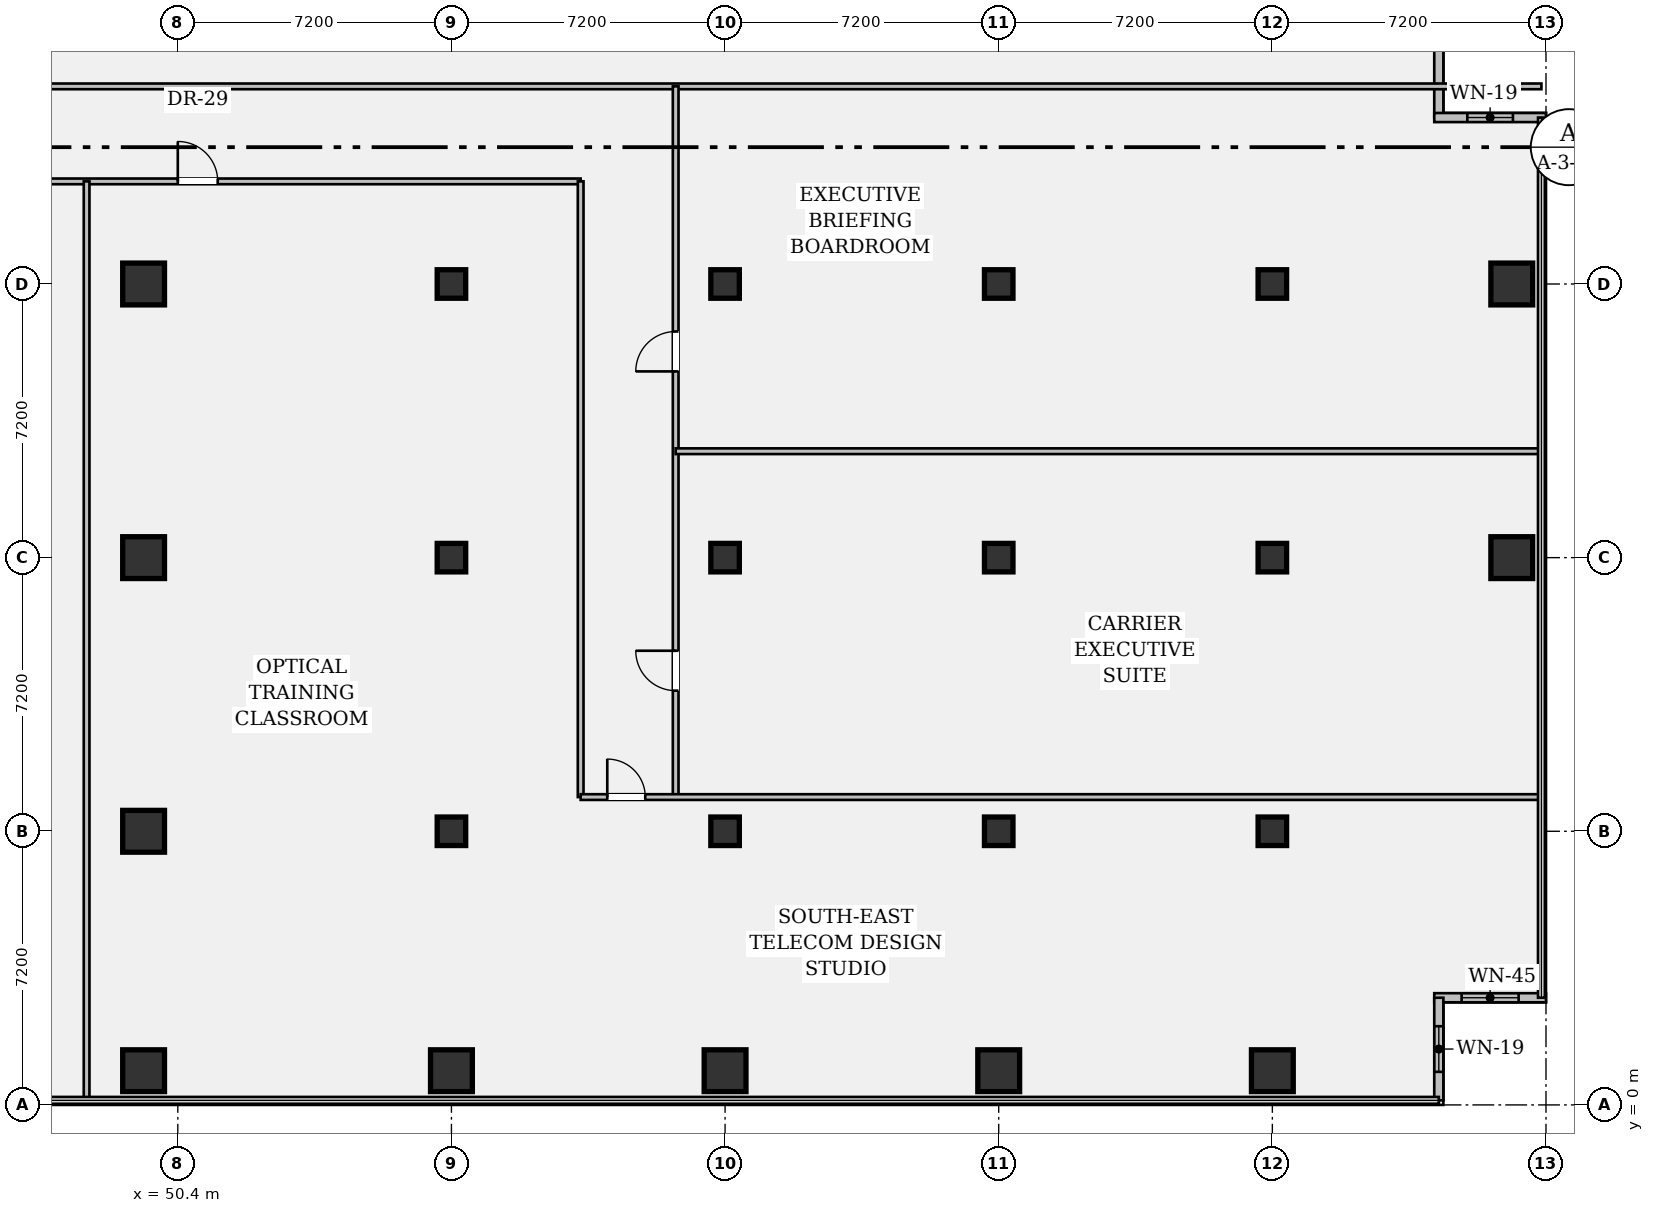
"""IFC4 building model, lengths in metres.
Left out: names, types, materials, properties, quantities, classifications, styles, units other than length and angle.
Written with IfcOpenShell. Run it as: python <this file> out.ifc"""

import sys

from ifc_helpers import new_model, si_unit, direction, frame, frame_2d, origin, origin_2d, place, context, subcontext, project, spatial, rectangle, hollow_rectangle, extrude, element, fill, save


model = new_model("IFC4")
c1 = context("Model", 3, precision=1e-05, world=origin(), true_north=direction((0.0, 1.0)))
c2 = subcontext(c1, "Body", "Model", "MODEL_VIEW")
j1 = project(units=[si_unit("LENGTHUNIT", "METRE"), si_unit("PLANEANGLEUNIT", "RADIAN")], contexts=[c1])
p1 = place(None, origin())
s1 = spatial("IfcSite", under=j1, at=p1, CompositionType="ELEMENT")
p2 = place(p1, origin())
s2 = spatial("IfcBuilding", under=s1, at=p2, CompositionType="ELEMENT")
p3 = place(p2, frame((0.0, 0.0, 17.85)))
s3 = spatial("IfcBuildingStorey", under=s2, at=p3, CompositionType="ELEMENT", Elevation=17.85)
for number, where, z_axis, x_axis in (
    (1, (49.5, 0.9, 0.0), (0.0, 0.0, 1.0), (1.0, 0.0, 0.0)),
    (2, (49.5, 7.2, 0.0), (0.0, 0.0, 1.0), (1.0, 0.0, 0.0)),
    (3, (49.5, 14.4, 0.0), (0.0, 0.0, 1.0), (1.0, 0.0, 0.0)),
    (4, (49.5, 21.6, 0.0), (0.0, 0.0, 1.0), (1.0, 0.0, 0.0)),
    (5, (57.6, 0.9, 0.0), (0.0, 0.0, 1.0), (1.0, 0.0, 0.0)),
):
    element("IfcColumn", number, at=place(p3, frame(where, z_axis=z_axis, x_axis=x_axis)), inside=s3, PredefinedType="COLUMN", context=c2, shape_type="SweptSolid", body=[
        extrude(hollow_rectangle(XDim=1.1, YDim=1.1, WallThickness=0.07, at=origin_2d()), origin(), (0.0, 0.0, 1.0), 3.91),
    ])
for number, where, z_axis, x_axis in (
    (6, (57.6, 7.2, 0.0), (0.0, 0.0, 1.0), (1.0, 0.0, 0.0)),
    (7, (57.6, 14.4, 0.0), (0.0, 0.0, 1.0), (1.0, 0.0, 0.0)),
    (8, (57.6, 21.6, 0.0), (0.0, 0.0, 1.0), (1.0, 0.0, 0.0)),
):
    element("IfcColumn", number, at=place(p3, frame(where, z_axis=z_axis, x_axis=x_axis)), inside=s3, PredefinedType="COLUMN", context=c2, shape_type="SweptSolid", body=[
        extrude(rectangle(XDim=0.75, YDim=0.75, at=origin_2d()), origin(), (0.0, 0.0, 1.0), 3.91),
    ])
p4 = place(p3, frame((64.8, 0.9, 0.0), z_axis=(0.0, 0.0, 1.0), x_axis=(1.0, 0.0, 0.0)))
e9 = element("IfcColumn", 9, at=p4, inside=s3, PredefinedType="COLUMN", context=c2, shape_type="SweptSolid", body=[
    extrude(hollow_rectangle(XDim=1.1, YDim=1.1, WallThickness=0.07, at=origin_2d()), origin(), (0.0, 0.0, 1.0), 3.91),
])
for number, where, z_axis, x_axis in (
    (10, (64.8, 7.2, 0.0), (0.0, 0.0, 1.0), (1.0, 0.0, 0.0)),
    (11, (64.8, 14.4, 0.0), (0.0, 0.0, 1.0), (1.0, 0.0, 0.0)),
    (12, (64.8, 21.6, 0.0), (0.0, 0.0, 1.0), (1.0, 0.0, 0.0)),
):
    element("IfcColumn", number, at=place(p3, frame(where, z_axis=z_axis, x_axis=x_axis)), inside=s3, PredefinedType="COLUMN", context=c2, shape_type="SweptSolid", body=[
        extrude(rectangle(XDim=0.75, YDim=0.75, at=origin_2d()), origin(), (0.0, 0.0, 1.0), 3.91),
    ])
p5 = place(p3, frame((72.0, 0.9, 0.0), z_axis=(0.0, 0.0, 1.0), x_axis=(1.0, 0.0, 0.0)))
e13 = element("IfcColumn", 13, at=p5, inside=s3, PredefinedType="COLUMN", context=c2, shape_type="SweptSolid", body=[
    extrude(hollow_rectangle(XDim=1.1, YDim=1.1, WallThickness=0.07, at=origin_2d()), origin(), (0.0, 0.0, 1.0), 3.91),
])
for number, where, z_axis, x_axis in (
    (14, (72.0, 7.2, 0.0), (0.0, 0.0, 1.0), (1.0, 0.0, 0.0)),
    (15, (72.0, 14.4, 0.0), (0.0, 0.0, 1.0), (1.0, 0.0, 0.0)),
    (16, (72.0, 21.6, 0.0), (0.0, 0.0, 1.0), (1.0, 0.0, 0.0)),
):
    element("IfcColumn", number, at=place(p3, frame(where, z_axis=z_axis, x_axis=x_axis)), inside=s3, PredefinedType="COLUMN", context=c2, shape_type="SweptSolid", body=[
        extrude(rectangle(XDim=0.75, YDim=0.75, at=origin_2d()), origin(), (0.0, 0.0, 1.0), 3.91),
    ])
p6 = place(p3, frame((79.2, 0.9, 0.0), z_axis=(0.0, 0.0, 1.0), x_axis=(1.0, 0.0, 0.0)))
e17 = element("IfcColumn", 17, at=p6, inside=s3, PredefinedType="COLUMN", context=c2, shape_type="SweptSolid", body=[
    extrude(hollow_rectangle(XDim=1.1, YDim=1.1, WallThickness=0.07, at=origin_2d()), origin(), (0.0, 0.0, 1.0), 3.91),
])
for number, where, z_axis, x_axis in (
    (18, (79.2, 7.2, 0.0), (0.0, 0.0, 1.0), (1.0, 0.0, 0.0)),
    (19, (79.2, 14.4, 0.0), (0.0, 0.0, 1.0), (1.0, 0.0, 0.0)),
    (20, (79.2, 21.6, 0.0), (0.0, 0.0, 1.0), (1.0, 0.0, 0.0)),
):
    element("IfcColumn", number, at=place(p3, frame(where, z_axis=z_axis, x_axis=x_axis)), inside=s3, PredefinedType="COLUMN", context=c2, shape_type="SweptSolid", body=[
        extrude(rectangle(XDim=0.75, YDim=0.75, at=origin_2d()), origin(), (0.0, 0.0, 1.0), 3.91),
    ])
for number, where, z_axis, x_axis in (
    (21, (85.5, 14.4, 0.0), (0.0, 0.0, 1.0), (1.0, 0.0, 0.0)),
    (22, (85.5, 21.6, 0.0), (0.0, 0.0, 1.0), (1.0, 0.0, 0.0)),
):
    element("IfcColumn", number, at=place(p3, frame(where, z_axis=z_axis, x_axis=x_axis)), inside=s3, PredefinedType="COLUMN", context=c2, shape_type="SweptSolid", body=[
        extrude(hollow_rectangle(XDim=1.1, YDim=1.1, WallThickness=0.07, at=origin_2d()), origin(), (0.0, 0.0, 1.0), 3.91),
    ])
p7 = place(p3, frame((83.58, 28.68, 0.0), z_axis=(0.0, 0.0, 1.0), x_axis=(0.0, -1.0, 0.0)))
e23 = element("IfcWall", 23, at=p7, inside=s3, PredefinedType="STANDARD", context=c2, shape_type="SweptSolid", body=[
    extrude(rectangle(XDim=2.7, YDim=0.24, at=frame_2d((1.35, 0.0))), origin(), (0.0, 0.0, 1.0), 3.91),
])
p8 = place(p3, frame((83.46, 25.98, 0.0), z_axis=(0.0, 0.0, 1.0), x_axis=(1.0, 0.0, 0.0)))
e24 = element("IfcWall", 24, at=p8, inside=s3, PredefinedType="STANDARD", context=c2, shape_type="SweptSolid", body=[
    extrude(rectangle(XDim=2.94, YDim=0.24, at=frame_2d((1.47, 0.0))), origin(), (0.0, 0.0, 1.0), 3.91),
])
p9 = place(p8, frame((0.87, 0.0, 0.95)))
e25 = element("IfcOpeningElement", 25, at=p9, cuts=e24, PredefinedType="OPENING", context=c2, shape_type="SweptSolid", body=[
    extrude(rectangle(XDim=1.2, YDim=1.8, at=frame_2d((0.6, 0.9))), frame((0.0, 0.132, 0.0), z_axis=(0.0, -1.0, 0.0), x_axis=(1.0, 0.0, 0.0)), (0.0, 0.0, 1.0), 0.264),
])
p10 = place(p3, frame((86.4, 2.82, 0.0), z_axis=(0.0, 0.0, 1.0), x_axis=(-1.0, 0.0, 0.0)))
e26 = element("IfcWall", 26, at=p10, inside=s3, PredefinedType="STANDARD", context=c2, shape_type="SweptSolid", body=[
    extrude(rectangle(XDim=2.94, YDim=0.24, at=frame_2d((1.47, 0.0))), origin(), (0.0, 0.0, 1.0), 3.91),
])
p11 = place(p10, frame((0.72, 0.0, 0.95)))
e27 = element("IfcOpeningElement", 27, at=p11, cuts=e26, PredefinedType="OPENING", context=c2, shape_type="SweptSolid", body=[
    extrude(rectangle(XDim=1.5, YDim=1.8, at=frame_2d((0.75, 0.9))), frame((0.0, 0.132, 0.0), z_axis=(0.0, -1.0, 0.0), x_axis=(1.0, 0.0, 0.0)), (0.0, 0.0, 1.0), 0.264),
])
p12 = place(p3, frame((83.58, 2.82, 0.0), z_axis=(0.0, 0.0, 1.0), x_axis=(0.0, -1.0, 0.0)))
e28 = element("IfcWall", 28, at=p12, inside=s3, PredefinedType="STANDARD", context=c2, shape_type="SweptSolid", body=[
    extrude(rectangle(XDim=2.7, YDim=0.24, at=frame_2d((1.35, 0.0))), origin(), (0.0, 0.0, 1.0), 3.91),
])
p13 = place(p12, frame((0.75, 0.0, 0.95)))
e29 = element("IfcOpeningElement", 29, at=p13, cuts=e28, PredefinedType="OPENING", context=c2, shape_type="SweptSolid", body=[
    extrude(rectangle(XDim=1.2, YDim=1.8, at=frame_2d((0.6, 0.9))), frame((0.0, 0.132, 0.0), z_axis=(0.0, -1.0, 0.0), x_axis=(1.0, 0.0, 0.0)), (0.0, 0.0, 1.0), 0.264),
])
p14 = place(p3, frame((17.45, 24.3, 0.0), z_axis=(0.0, 0.0, 1.0), x_axis=(1.0, 0.0, 0.0)))
e30 = element("IfcWall", 30, at=p14, inside=s3, PredefinedType="PARTITIONING", context=c2, shape_type="SweptSolid", body=[
    extrude(rectangle(XDim=43.55, YDim=0.15, at=frame_2d((21.775, 0.0))), origin(), (0.0, 0.0, 1.0), 2.968),
])
p15 = place(p14, frame((3.2, 0.0, 0.0)))
e31 = element("IfcOpeningElement", 31, at=p15, cuts=e30, PredefinedType="OPENING", context=c2, shape_type="SweptSolid", body=[
    extrude(rectangle(XDim=1.2, YDim=2.15, at=frame_2d((0.6, 1.075))), frame((0.0, 0.087, 0.0), z_axis=(0.0, -1.0, 0.0), x_axis=(1.0, 0.0, 0.0)), (0.0, 0.0, 1.0), 0.174),
])
p16 = place(p14, frame((18.55, 0.0, 0.0)))
e32 = element("IfcOpeningElement", 32, at=p16, cuts=e30, PredefinedType="OPENING", context=c2, shape_type="SweptSolid", body=[
    extrude(rectangle(XDim=1.2, YDim=2.15, at=frame_2d((0.6, 1.075))), frame((0.0, 0.087, 0.0), z_axis=(0.0, -1.0, 0.0), x_axis=(1.0, 0.0, 0.0)), (0.0, 0.0, 1.0), 0.174),
])
p17 = place(p14, frame((32.95, 0.0, 0.0)))
e33 = element("IfcOpeningElement", 33, at=p17, cuts=e30, PredefinedType="OPENING", context=c2, shape_type="SweptSolid", body=[
    extrude(rectangle(XDim=1.05, YDim=2.15, at=frame_2d((0.525, 1.075))), frame((0.0, 0.087, 0.0), z_axis=(0.0, -1.0, 0.0), x_axis=(1.0, 0.0, 0.0)), (0.0, 0.0, 1.0), 0.174),
])
p18 = place(p3, frame((17.45, 26.8, 0.0), z_axis=(0.0, 0.0, 1.0), x_axis=(1.0, 0.0, 0.0)))
e34 = element("IfcWall", 34, at=p18, inside=s3, PredefinedType="PARTITIONING", context=c2, shape_type="SweptSolid", body=[
    extrude(rectangle(XDim=68.83, YDim=0.15, at=frame_2d((34.415, 0.0))), origin(), (0.0, 0.0, 1.0), 2.968),
])
p19 = place(p18, frame((6.2, 0.0, 0.0)))
e35 = element("IfcOpeningElement", 35, at=p19, cuts=e34, PredefinedType="OPENING", context=c2, shape_type="SweptSolid", body=[
    extrude(rectangle(XDim=1.05, YDim=2.15, at=frame_2d((0.525, 1.075))), frame((0.0, 0.087, 0.0), z_axis=(0.0, -1.0, 0.0), x_axis=(1.0, 0.0, 0.0)), (0.0, 0.0, 1.0), 0.174),
])
p20 = place(p18, frame((20.4, 0.0, 0.0)))
e36 = element("IfcOpeningElement", 36, at=p20, cuts=e34, PredefinedType="OPENING", context=c2, shape_type="SweptSolid", body=[
    extrude(rectangle(XDim=1.05, YDim=2.15, at=frame_2d((0.525, 1.075))), frame((0.0, 0.087, 0.0), z_axis=(0.0, -1.0, 0.0), x_axis=(1.0, 0.0, 0.0)), (0.0, 0.0, 1.0), 0.174),
])
p21 = place(p3, frame((61.0, 8.1, 0.0), z_axis=(0.0, 0.0, 1.0), x_axis=(0.0, 1.0, 0.0)))
e37 = element("IfcWall", 37, at=p21, inside=s3, PredefinedType="PARTITIONING", context=c2, shape_type="SweptSolid", body=[
    extrude(rectangle(XDim=16.2, YDim=0.15, at=frame_2d((8.1, 0.0))), origin(), (0.0, 0.0, 1.0), 2.968),
])
p22 = place(p3, frame((63.5, 8.1, 0.0), z_axis=(0.0, 0.0, 1.0), x_axis=(0.0, 1.0, 0.0)))
e38 = element("IfcWall", 38, at=p22, inside=s3, PredefinedType="PARTITIONING", context=c2, shape_type="SweptSolid", body=[
    extrude(rectangle(XDim=18.7, YDim=0.15, at=frame_2d((9.35, 0.0))), origin(), (0.0, 0.0, 1.0), 2.968),
])
p23 = place(p22, frame((11.2, 0.0, 0.0)))
e39 = element("IfcOpeningElement", 39, at=p23, cuts=e38, PredefinedType="OPENING", context=c2, shape_type="SweptSolid", body=[
    extrude(rectangle(XDim=1.05, YDim=2.15, at=frame_2d((0.525, 1.075))), frame((0.0, 0.087, 0.0), z_axis=(0.0, -1.0, 0.0), x_axis=(1.0, 0.0, 0.0)), (0.0, 0.0, 1.0), 0.174),
])
p24 = place(p22, frame((2.8, 0.0, 0.0)))
e40 = element("IfcOpeningElement", 40, at=p24, cuts=e38, PredefinedType="OPENING", context=c2, shape_type="SweptSolid", body=[
    extrude(rectangle(XDim=1.05, YDim=2.15, at=frame_2d((0.525, 1.075))), frame((0.0, 0.087, 0.0), z_axis=(0.0, -1.0, 0.0), x_axis=(1.0, 0.0, 0.0)), (0.0, 0.0, 1.0), 0.174),
])
p25 = place(p3, frame((61.0, 8.1, 0.0), z_axis=(0.0, 0.0, 1.0), x_axis=(1.0, 0.0, 0.0)))
e41 = element("IfcWall", 41, at=p25, inside=s3, PredefinedType="PARTITIONING", context=c2, shape_type="SweptSolid", body=[
    extrude(rectangle(XDim=25.28, YDim=0.15, at=frame_2d((12.64, 0.0))), origin(), (0.0, 0.0, 1.0), 2.968),
])
p26 = place(p25, frame((0.7, 0.0, 0.0)))
e42 = element("IfcOpeningElement", 42, at=p26, cuts=e41, PredefinedType="OPENING", context=c2, shape_type="SweptSolid", body=[
    extrude(rectangle(XDim=1.0, YDim=2.15, at=frame_2d((0.5, 1.075))), frame((0.0, 0.087, 0.0), z_axis=(0.0, -1.0, 0.0), x_axis=(1.0, 0.0, 0.0)), (0.0, 0.0, 1.0), 0.174),
])
p27 = place(p3, frame((48.0, 0.12, 0.0), z_axis=(0.0, 0.0, 1.0), x_axis=(0.0, 1.0, 0.0)))
e43 = element("IfcWall", 43, at=p27, inside=s3, PredefinedType="PARTITIONING", context=c2, shape_type="SweptSolid", body=[
    extrude(rectangle(XDim=24.18, YDim=0.15, at=frame_2d((12.09, 0.0))), origin(), (0.0, 0.0, 1.0), 2.968),
])
p28 = place(p3, frame((63.5, 17.2, 0.0), z_axis=(0.0, 0.0, 1.0), x_axis=(1.0, 0.0, 0.0)))
e44 = element("IfcWall", 44, at=p28, inside=s3, PredefinedType="PARTITIONING", context=c2, shape_type="SweptSolid", body=[
    extrude(rectangle(XDim=22.78, YDim=0.15, at=frame_2d((11.39, 0.0))), origin(), (0.0, 0.0, 1.0), 2.968),
])
p29 = place(p9, origin())
e45 = element("IfcWindow", 45, at=p29, inside=s3, PartitioningType="SINGLE_PANEL", PredefinedType="WINDOW", context=c2, shape_type="SweptSolid", body=[
    extrude(rectangle(XDim=1.2, YDim=1.8, at=frame_2d((0.6, 0.9))), frame((0.0, 0.03, 0.0), z_axis=(0.0, -1.0, 0.0), x_axis=(1.0, 0.0, 0.0)), (0.0, 0.0, 1.0), 0.06),
])
fill(e25, e45)
p30 = place(p11, origin())
e46 = element("IfcWindow", 46, at=p30, inside=s3, PartitioningType="SINGLE_PANEL", PredefinedType="WINDOW", context=c2, shape_type="SweptSolid", body=[
    extrude(rectangle(XDim=1.5, YDim=1.8, at=frame_2d((0.75, 0.9))), frame((0.0, 0.03, 0.0), z_axis=(0.0, -1.0, 0.0), x_axis=(1.0, 0.0, 0.0)), (0.0, 0.0, 1.0), 0.06),
])
fill(e27, e46)
p31 = place(p13, origin())
e47 = element("IfcWindow", 47, at=p31, inside=s3, PartitioningType="SINGLE_PANEL", PredefinedType="WINDOW", context=c2, shape_type="SweptSolid", body=[
    extrude(rectangle(XDim=1.2, YDim=1.8, at=frame_2d((0.6, 0.9))), frame((0.0, 0.03, 0.0), z_axis=(0.0, -1.0, 0.0), x_axis=(1.0, 0.0, 0.0)), (0.0, 0.0, 1.0), 0.06),
])
fill(e29, e47)
p32 = place(p17, origin())
e48 = element("IfcDoor", 48, at=p32, inside=s3, OperationType="SINGLE_SWING_LEFT", PredefinedType="DOOR", context=c2, shape_type="SweptSolid", body=[
    extrude(rectangle(XDim=1.05, YDim=2.15, at=frame_2d((0.525, 1.075))), frame((0.0, 0.025, 0.0), z_axis=(0.0, -1.0, 0.0), x_axis=(1.0, 0.0, 0.0)), (0.0, 0.0, 1.0), 0.05),
])
fill(e33, e48)
p33 = place(p23, origin())
e49 = element("IfcDoor", 49, at=p33, inside=s3, OperationType="SINGLE_SWING_LEFT", PredefinedType="DOOR", context=c2, shape_type="SweptSolid", body=[
    extrude(rectangle(XDim=1.05, YDim=2.15, at=frame_2d((0.525, 1.075))), frame((0.0, 0.025, 0.0), z_axis=(0.0, -1.0, 0.0), x_axis=(1.0, 0.0, 0.0)), (0.0, 0.0, 1.0), 0.05),
])
fill(e39, e49)
p34 = place(p24, origin())
e50 = element("IfcDoor", 50, at=p34, inside=s3, OperationType="SINGLE_SWING_RIGHT", PredefinedType="DOOR", context=c2, shape_type="SweptSolid", body=[
    extrude(rectangle(XDim=1.05, YDim=2.15, at=frame_2d((0.525, 1.075))), frame((0.0, 0.025, 0.0), z_axis=(0.0, -1.0, 0.0), x_axis=(1.0, 0.0, 0.0)), (0.0, 0.0, 1.0), 0.05),
])
fill(e40, e50)
p35 = place(p26, origin())
e51 = element("IfcDoor", 51, at=p35, inside=s3, OperationType="SINGLE_SWING_LEFT", PredefinedType="DOOR", context=c2, shape_type="SweptSolid", body=[
    extrude(rectangle(XDim=1.0, YDim=2.15, at=frame_2d((0.5, 1.075))), frame((0.0, 0.025, 0.0), z_axis=(0.0, -1.0, 0.0), x_axis=(1.0, 0.0, 0.0)), (0.0, 0.0, 1.0), 0.05),
])
fill(e42, e51)
save(model, sys.argv[1])
